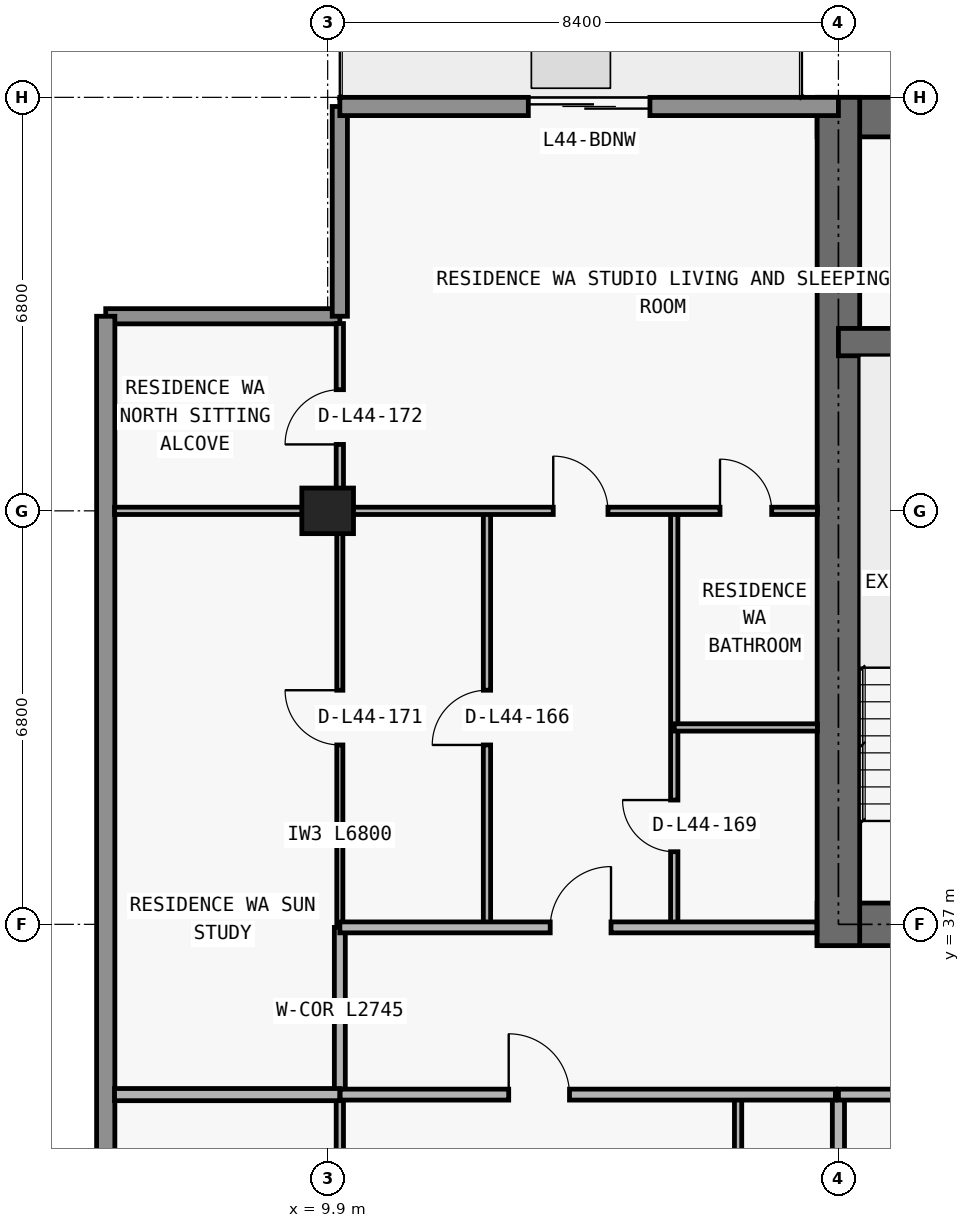
"""IFC4 building model, lengths in metres.
Left out: names, types, materials, properties, quantities, classifications, styles, units other than length and angle.
Written with IfcOpenShell. Run it as: python <this file> out.ifc"""

import sys

from ifc_helpers import new_model, si_unit, direction, frame, frame_2d, origin, origin_2d, place, context, subcontext, project, spatial, rectangle, extrude, element, fill, save


model = new_model("IFC4")
c1 = context("Model", 3, precision=1e-05, world=origin(), true_north=direction((0.0, 1.0)))
c2 = subcontext(c1, "Body", "Model", "MODEL_VIEW")
j1 = project(units=[si_unit("LENGTHUNIT", "METRE"), si_unit("PLANEANGLEUNIT", "RADIAN")], contexts=[c1])
p1 = place(None, origin())
s1 = spatial("IfcSite", under=j1, at=p1, CompositionType="ELEMENT")
p2 = place(p1, origin())
s2 = spatial("IfcBuilding", under=s1, at=p2, CompositionType="ELEMENT")
p3 = place(p2, frame((0.0, 0.0, 160.5)))
s3 = spatial("IfcBuildingStorey", under=s2, at=p3, CompositionType="ELEMENT", Elevation=160.5)
p4 = place(p3, frame((9.9, 43.8, 0.0), z_axis=(0.0, 0.0, 1.0), x_axis=(1.0, 0.0, 0.0)))
e1 = element("IfcColumn", 1, at=p4, inside=s3, PredefinedType="COLUMN", context=c2, shape_type="SweptSolid", body=[
    extrude(rectangle(XDim=0.85, YDim=0.75, at=origin_2d()), origin(), (0.0, 0.0, 1.0), 3.05),
])
p5 = place(p3, frame((17.95, 37.0, 0.0), z_axis=(0.0, 0.0, 1.0), x_axis=(1.0, 0.0, 0.0)))
e2 = element("IfcWall", 2, at=p5, inside=s3, PredefinedType="SHEAR", context=c2, shape_type="SweptSolid", body=[
    extrude(rectangle(XDim=41.9, YDim=0.7, at=frame_2d((20.95, 0.0))), origin(), (0.0, 0.0, 1.0), 3.05),
])
p6 = place(p5, frame((14.35, 0.0, 0.0)))
e3 = element("IfcOpeningElement", 3, at=p6, cuts=e2, PredefinedType="OPENING", context=c2, shape_type="SweptSolid", body=[
    extrude(rectangle(XDim=1.1, YDim=2.15, at=frame_2d((0.55, 1.075))), frame((0.0, 0.36, 0.0), z_axis=(0.0, -1.0, 0.0), x_axis=(1.0, 0.0, 0.0)), (0.0, 0.0, 1.0), 0.72),
])
p7 = place(p5, frame((6.2, 0.0, 0.0)))
e4 = element("IfcOpeningElement", 4, at=p7, cuts=e2, PredefinedType="OPENING", context=c2, shape_type="SweptSolid", body=[
    extrude(rectangle(XDim=1.05, YDim=2.15, at=frame_2d((0.525, 1.075))), frame((0.0, 0.36, 0.0), z_axis=(0.0, -1.0, 0.0), x_axis=(1.0, 0.0, 0.0)), (0.0, 0.0, 1.0), 0.72),
])
p8 = place(p5, frame((34.7, 0.0, 0.0)))
e5 = element("IfcOpeningElement", 5, at=p8, cuts=e2, PredefinedType="OPENING", context=c2, shape_type="SweptSolid", body=[
    extrude(rectangle(XDim=1.05, YDim=2.15, at=frame_2d((0.525, 1.075))), frame((0.0, 0.36, 0.0), z_axis=(0.0, -1.0, 0.0), x_axis=(1.0, 0.0, 0.0)), (0.0, 0.0, 1.0), 0.72),
])
p9 = place(p5, frame((10.812, 0.0, 0.0)))
e6 = element("IfcOpeningElement", 6, at=p9, cuts=e2, PredefinedType="OPENING", context=c2, shape_type="SweptSolid", body=[
    extrude(rectangle(XDim=1.05, YDim=2.15, at=frame_2d((0.525, 1.075))), frame((0.0, 0.36, 0.0), z_axis=(0.0, -1.0, 0.0), x_axis=(1.0, 0.0, 0.0)), (0.0, 0.0, 1.0), 0.72),
])
p10 = place(p5, frame((24.05, 0.0, 0.0)))
e7 = element("IfcOpeningElement", 7, at=p10, cuts=e2, PredefinedType="OPENING", context=c2, shape_type="SweptSolid", body=[
    extrude(rectangle(XDim=1.05, YDim=2.15, at=frame_2d((0.525, 1.075))), frame((0.0, 0.36, 0.0), z_axis=(0.0, -1.0, 0.0), x_axis=(1.0, 0.0, 0.0)), (0.0, 0.0, 1.0), 0.72),
])
p11 = place(p3, frame((17.95, 50.275, 0.0), z_axis=(0.0, 0.0, 1.0), x_axis=(1.0, 0.0, 0.0)))
e8 = element("IfcWall", 8, at=p11, inside=s3, PredefinedType="SHEAR", context=c2, shape_type="SweptSolid", body=[
    extrude(rectangle(XDim=41.9, YDim=0.65, at=frame_2d((20.95, 0.0))), origin(), (0.0, 0.0, 1.0), 3.05),
])
p12 = place(p3, frame((18.3, 36.65, 0.0), z_axis=(0.0, 0.0, 1.0), x_axis=(0.0, 1.0, 0.0)))
e9 = element("IfcWall", 9, at=p12, inside=s3, PredefinedType="SHEAR", context=c2, shape_type="SweptSolid", body=[
    extrude(rectangle(XDim=13.95, YDim=0.7, at=frame_2d((6.975, 0.0))), origin(), (0.0, 0.0, 1.0), 3.05),
])
p13 = place(p3, frame((18.3, 46.575, 0.0), z_axis=(0.0, 0.0, 1.0), x_axis=(1.0, 0.0, 0.0)))
e10 = element("IfcWall", 10, at=p13, inside=s3, PredefinedType="SHEAR", context=c2, shape_type="SweptSolid", body=[
    extrude(rectangle(XDim=41.2, YDim=0.45, at=frame_2d((20.6, 0.0))), origin(), (0.0, 0.0, 1.0), 3.05),
])
p14 = place(p13, frame((7.6, 0.0, 0.0)))
e11 = element("IfcOpeningElement", 11, at=p14, cuts=e10, PredefinedType="OPENING", context=c2, shape_type="SweptSolid", body=[
    extrude(rectangle(XDim=1.0, YDim=2.2, at=frame_2d((0.5, 1.1))), frame((0.0, 0.235, 0.0), z_axis=(0.0, -1.0, 0.0), x_axis=(1.0, 0.0, 0.0)), (0.0, 0.0, 1.0), 0.47),
])
p15 = place(p13, frame((32.625, 0.0, 0.0)))
e12 = element("IfcOpeningElement", 12, at=p15, cuts=e10, PredefinedType="OPENING", context=c2, shape_type="SweptSolid", body=[
    extrude(rectangle(XDim=1.05, YDim=2.15, at=frame_2d((0.525, 1.075))), frame((0.0, 0.235, 0.0), z_axis=(0.0, -1.0, 0.0), x_axis=(1.0, 0.0, 0.0)), (0.0, 0.0, 1.0), 0.47),
])
p16 = place(p3, frame((6.25, 47.0, 0.0), z_axis=(0.0, 0.0, 1.0), x_axis=(1.0, 0.0, 0.0)))
e13 = element("IfcWall", 13, at=p16, inside=s3, PredefinedType="ELEMENTEDWALL", context=c2, shape_type="SweptSolid", body=[
    extrude(rectangle(XDim=3.85, YDim=0.25, at=frame_2d((1.925, 0.0))), origin(), (0.0, 0.0, 1.0), 3.05),
])
p17 = place(p3, frame((10.1, 47.0, 0.0), z_axis=(0.0, 0.0, 1.0), x_axis=(0.0, 1.0, 0.0)))
e14 = element("IfcWall", 14, at=p17, inside=s3, PredefinedType="ELEMENTEDWALL", context=c2, shape_type="SweptSolid", body=[
    extrude(rectangle(XDim=3.45, YDim=0.25, at=frame_2d((1.725, 0.0))), origin(), (0.0, 0.0, 1.0), 3.05),
])
p18 = place(p3, frame((6.25, 29.1, 0.0), z_axis=(0.0, 0.0, 1.0), x_axis=(0.0, 1.0, 0.0)))
e15 = element("IfcWall", 15, at=p18, inside=s3, PredefinedType="STANDARD", context=c2, shape_type="SweptSolid", body=[
    extrude(rectangle(XDim=17.9, YDim=0.3, at=frame_2d((8.95, 0.0))), origin(), (0.0, 0.0, 1.0), 3.05),
])
p19 = place(p3, frame((10.1, 50.45, 0.0), z_axis=(0.0, 0.0, 1.0), x_axis=(1.0, 0.0, 0.0)))
e16 = element("IfcWall", 16, at=p19, inside=s3, PredefinedType="STANDARD", context=c2, shape_type="SweptSolid", body=[
    extrude(rectangle(XDim=8.2, YDim=0.3, at=frame_2d((4.1, 0.0))), origin(), (0.0, 0.0, 1.0), 3.05),
])
p20 = place(p19, frame((3.1, 0.0, 0.0)))
e17 = element("IfcOpeningElement", 17, at=p20, cuts=e16, PredefinedType="OPENING", context=c2, shape_type="SweptSolid", body=[
    extrude(rectangle(XDim=2.0, YDim=2.3, at=frame_2d((1.0, 1.15))), frame((0.0, 0.16, 0.0), z_axis=(0.0, -1.0, 0.0), x_axis=(1.0, 0.0, 0.0)), (0.0, 0.0, 1.0), 0.32),
])
p21 = place(p3, frame((10.1, 27.64, 0.0), z_axis=(0.0, 0.0, 1.0), x_axis=(0.0, 1.0, 0.0)))
e18 = element("IfcWall", 18, at=p21, inside=s3, PredefinedType="PARTITIONING", context=c2, shape_type="SweptSolid", body=[
    extrude(rectangle(XDim=6.56, YDim=0.12, at=frame_2d((3.28, 0.0))), origin(), (0.0, 0.0, 1.0), 2.263),
])
p22 = place(p3, frame((10.1, 34.205, 0.0), z_axis=(0.0, 0.0, 1.0), x_axis=(0.0, 1.0, 0.0)))
e19 = element("IfcWall", 19, at=p22, inside=s3, PredefinedType="PARTITIONING", context=c2, shape_type="SweptSolid", body=[
    extrude(rectangle(XDim=2.745, YDim=0.18, at=frame_2d((1.373, 0.0))), origin(), (0.0, 0.0, 1.0), 2.263),
])
p23 = place(p3, frame((10.1, 37.0, 0.0), z_axis=(0.0, 0.0, 1.0), x_axis=(0.0, 1.0, 0.0)))
e20 = element("IfcWall", 20, at=p23, inside=s3, PredefinedType="MOVABLE", context=c2, shape_type="SweptSolid", body=[
    extrude(rectangle(XDim=6.8, YDim=0.1, at=frame_2d((3.4, 0.0))), origin(), (0.0, 0.0, 1.0), 2.263),
])
p24 = place(p23, frame((2.95, 0.0, 0.0)))
e21 = element("IfcOpeningElement", 21, at=p24, cuts=e20, PredefinedType="OPENING", context=c2, shape_type="SweptSolid", body=[
    extrude(rectangle(XDim=0.9, YDim=2.15, at=frame_2d((0.45, 1.075))), frame((0.0, 0.06, 0.0), z_axis=(0.0, -1.0, 0.0), x_axis=(1.0, 0.0, 0.0)), (0.0, 0.0, 1.0), 0.12),
])
p25 = place(p3, frame((10.1, 43.805, 0.0), z_axis=(0.0, 0.0, 1.0), x_axis=(0.0, 1.0, 0.0)))
e22 = element("IfcWall", 22, at=p25, inside=s3, PredefinedType="PARTITIONING", context=c2, shape_type="SweptSolid", body=[
    extrude(rectangle(XDim=3.075, YDim=0.12, at=frame_2d((1.538, 0.0))), origin(), (0.0, 0.0, 1.0), 3.05),
])
p26 = place(p25, frame((1.087, 0.0, 0.0)))
e23 = element("IfcOpeningElement", 23, at=p26, cuts=e22, PredefinedType="OPENING", context=c2, shape_type="SweptSolid", body=[
    extrude(rectangle(XDim=0.9, YDim=2.15, at=frame_2d((0.45, 1.075))), frame((0.0, 0.07, 0.0), z_axis=(0.0, -1.0, 0.0), x_axis=(1.0, 0.0, 0.0)), (0.0, 0.0, 1.0), 0.14),
])
p27 = place(p3, frame((12.52, 37.0, 0.0), z_axis=(0.0, 0.0, 1.0), x_axis=(0.0, 1.0, 0.0)))
e24 = element("IfcWall", 24, at=p27, inside=s3, PredefinedType="PARTITIONING", context=c2, shape_type="SweptSolid", body=[
    extrude(rectangle(XDim=6.8, YDim=0.12, at=frame_2d((3.4, 0.0))), origin(), (0.0, 0.0, 1.0), 2.578),
])
p28 = place(p27, frame((2.95, 0.0, 0.0)))
e25 = element("IfcOpeningElement", 25, at=p28, cuts=e24, PredefinedType="OPENING", context=c2, shape_type="SweptSolid", body=[
    extrude(rectangle(XDim=0.9, YDim=2.15, at=frame_2d((0.45, 1.075))), frame((0.0, 0.07, 0.0), z_axis=(0.0, -1.0, 0.0), x_axis=(1.0, 0.0, 0.0)), (0.0, 0.0, 1.0), 0.14),
])
p29 = place(p3, frame((15.6, 37.0, 0.0), z_axis=(0.0, 0.0, 1.0), x_axis=(0.0, 1.0, 0.0)))
e26 = element("IfcWall", 26, at=p29, inside=s3, PredefinedType="PARTITIONING", context=c2, shape_type="SweptSolid", body=[
    extrude(rectangle(XDim=6.8, YDim=0.12, at=frame_2d((3.4, 0.0))), origin(), (0.0, 0.0, 1.0), 2.679),
])
p30 = place(p29, frame((1.194, 0.0, 0.0)))
e27 = element("IfcOpeningElement", 27, at=p30, cuts=e26, PredefinedType="OPENING", context=c2, shape_type="SweptSolid", body=[
    extrude(rectangle(XDim=0.85, YDim=2.1, at=frame_2d((0.425, 1.05))), frame((0.0, 0.07, 0.0), z_axis=(0.0, -1.0, 0.0), x_axis=(1.0, 0.0, 0.0)), (0.0, 0.0, 1.0), 0.14),
])
p31 = place(p3, frame((16.65, 27.64, 0.0), z_axis=(0.0, 0.0, 1.0), x_axis=(0.0, 1.0, 0.0)))
e28 = element("IfcWall", 28, at=p31, inside=s3, PredefinedType="PARTITIONING", context=c2, shape_type="SweptSolid", body=[
    extrude(rectangle(XDim=6.56, YDim=0.12, at=frame_2d((3.28, 0.0))), origin(), (0.0, 0.0, 1.0), 3.05),
])
p32 = place(p31, frame((2.855, 0.0, 0.0)))
e29 = element("IfcOpeningElement", 29, at=p32, cuts=e28, PredefinedType="OPENING", context=c2, shape_type="SweptSolid", body=[
    extrude(rectangle(XDim=0.85, YDim=2.1, at=frame_2d((0.425, 1.05))), frame((0.0, 0.07, 0.0), z_axis=(0.0, -1.0, 0.0), x_axis=(1.0, 0.0, 0.0)), (0.0, 0.0, 1.0), 0.14),
])
p33 = place(p3, frame((18.3, 27.64, 0.0), z_axis=(0.0, 0.0, 1.0), x_axis=(0.0, 1.0, 0.0)))
e30 = element("IfcWall", 30, at=p33, inside=s3, PredefinedType="PARTITIONING", context=c2, shape_type="SweptSolid", body=[
    extrude(rectangle(XDim=6.56, YDim=0.2, at=frame_2d((3.28, 0.0))), origin(), (0.0, 0.0, 1.0), 2.263),
])
p34 = place(p3, frame((6.395, 34.2, 0.0), z_axis=(0.0, 0.0, 1.0), x_axis=(1.0, 0.0, 0.0)))
e31 = element("IfcWall", 31, at=p34, inside=s3, PredefinedType="PARTITIONING", context=c2, shape_type="SweptSolid", body=[
    extrude(rectangle(XDim=3.705, YDim=0.2, at=frame_2d((1.853, 0.0))), origin(), (0.0, 0.0, 1.0), 3.05),
])
p35 = place(p3, frame((10.105, 34.2, 0.0), z_axis=(0.0, 0.0, 1.0), x_axis=(1.0, 0.0, 0.0)))
e32 = element("IfcWall", 32, at=p35, inside=s3, PredefinedType="PARTITIONING", context=c2, shape_type="SweptSolid", body=[
    extrude(rectangle(XDim=8.145, YDim=0.18, at=frame_2d((4.073, 0.0))), origin(), (0.0, 0.0, 1.0), 3.05),
])
p36 = place(p35, frame((2.772, 0.0, 0.0)))
e33 = element("IfcOpeningElement", 33, at=p36, cuts=e32, PredefinedType="OPENING", context=c2, shape_type="SweptSolid", body=[
    extrude(rectangle(XDim=1.0, YDim=2.2, at=frame_2d((0.5, 1.1))), frame((0.0, 0.1, 0.0), z_axis=(0.0, -1.0, 0.0), x_axis=(1.0, 0.0, 0.0)), (0.0, 0.0, 1.0), 0.2),
])
p37 = place(p3, frame((18.3, 34.2, 0.0), z_axis=(0.0, 0.0, 1.0), x_axis=(1.0, 0.0, 0.0)))
e34 = element("IfcWall", 34, at=p37, inside=s3, PredefinedType="PARTITIONING", context=c2, shape_type="SweptSolid", body=[
    extrude(rectangle(XDim=37.586, YDim=0.18, at=frame_2d((18.793, 0.0))), origin(), (0.0, 0.0, 1.0), 3.05),
])
p38 = place(p37, frame((2.875, 0.0, 0.0)))
e35 = element("IfcOpeningElement", 35, at=p38, cuts=e34, PredefinedType="OPENING", context=c2, shape_type="SweptSolid", body=[
    extrude(rectangle(XDim=1.0, YDim=2.2, at=frame_2d((0.5, 1.1))), frame((0.0, 0.1, 0.0), z_axis=(0.0, -1.0, 0.0), x_axis=(1.0, 0.0, 0.0)), (0.0, 0.0, 1.0), 0.2),
])
p39 = place(p37, frame((11.315, 0.0, 0.0)))
e36 = element("IfcOpeningElement", 36, at=p39, cuts=e34, PredefinedType="OPENING", context=c2, shape_type="SweptSolid", body=[
    extrude(rectangle(XDim=1.0, YDim=2.2, at=frame_2d((0.5, 1.1))), frame((0.0, 0.1, 0.0), z_axis=(0.0, -1.0, 0.0), x_axis=(1.0, 0.0, 0.0)), (0.0, 0.0, 1.0), 0.2),
])
p40 = place(p37, frame((27.275, 0.0, 0.0)))
e37 = element("IfcOpeningElement", 37, at=p40, cuts=e34, PredefinedType="OPENING", context=c2, shape_type="SweptSolid", body=[
    extrude(rectangle(XDim=1.0, YDim=2.2, at=frame_2d((0.5, 1.1))), frame((0.0, 0.1, 0.0), z_axis=(0.0, -1.0, 0.0), x_axis=(1.0, 0.0, 0.0)), (0.0, 0.0, 1.0), 0.2),
])
p41 = place(p37, frame((34.693, 0.0, 0.0)))
e38 = element("IfcOpeningElement", 38, at=p41, cuts=e34, PredefinedType="OPENING", context=c2, shape_type="SweptSolid", body=[
    extrude(rectangle(XDim=1.0, YDim=2.2, at=frame_2d((0.5, 1.1))), frame((0.0, 0.1, 0.0), z_axis=(0.0, -1.0, 0.0), x_axis=(1.0, 0.0, 0.0)), (0.0, 0.0, 1.0), 0.2),
])
p42 = place(p3, frame((10.1, 36.95, 0.0), z_axis=(0.0, 0.0, 1.0), x_axis=(1.0, 0.0, 0.0)))
e39 = element("IfcWall", 39, at=p42, inside=s3, PredefinedType="PARTITIONING", context=c2, shape_type="SweptSolid", body=[
    extrude(rectangle(XDim=7.845, YDim=0.18, at=frame_2d((3.922, 0.0))), origin(), (0.0, 0.0, 1.0), 3.05),
])
p43 = place(p42, frame((3.46, 0.0, 0.0)))
e40 = element("IfcOpeningElement", 40, at=p43, cuts=e39, PredefinedType="OPENING", context=c2, shape_type="SweptSolid", body=[
    extrude(rectangle(XDim=1.0, YDim=2.2, at=frame_2d((0.5, 1.1))), frame((0.0, 0.1, 0.0), z_axis=(0.0, -1.0, 0.0), x_axis=(1.0, 0.0, 0.0)), (0.0, 0.0, 1.0), 0.2),
])
p44 = place(p3, frame((15.6, 40.238, 0.0), z_axis=(0.0, 0.0, 1.0), x_axis=(1.0, 0.0, 0.0)))
e41 = element("IfcWall", 41, at=p44, inside=s3, PredefinedType="PARTITIONING", context=c2, shape_type="SweptSolid", body=[
    extrude(rectangle(XDim=2.355, YDim=0.12, at=frame_2d((1.177, 0.0))), origin(), (0.0, 0.0, 1.0), 3.05),
])
p45 = place(p3, frame((6.395, 43.8, 0.0), z_axis=(0.0, 0.0, 1.0), x_axis=(1.0, 0.0, 0.0)))
e42 = element("IfcWall", 42, at=p45, inside=s3, PredefinedType="PARTITIONING", context=c2, shape_type="SweptSolid", body=[
    extrude(rectangle(XDim=11.56, YDim=0.12, at=frame_2d((5.78, 0.0))), origin(), (0.0, 0.0, 1.0), 2.418),
])
p46 = place(p45, frame((7.215, 0.0, 0.0)))
e43 = element("IfcOpeningElement", 43, at=p46, cuts=e42, PredefinedType="OPENING", context=c2, shape_type="SweptSolid", body=[
    extrude(rectangle(XDim=0.9, YDim=2.15, at=frame_2d((0.45, 1.075))), frame((0.0, 0.07, 0.0), z_axis=(0.0, -1.0, 0.0), x_axis=(1.0, 0.0, 0.0)), (0.0, 0.0, 1.0), 0.14),
])
p47 = place(p45, frame((9.958, 0.0, 0.0)))
e44 = element("IfcOpeningElement", 44, at=p47, cuts=e42, PredefinedType="OPENING", context=c2, shape_type="SweptSolid", body=[
    extrude(rectangle(XDim=0.85, YDim=2.1, at=frame_2d((0.425, 1.05))), frame((0.0, 0.07, 0.0), z_axis=(0.0, -1.0, 0.0), x_axis=(1.0, 0.0, 0.0)), (0.0, 0.0, 1.0), 0.14),
])
p48 = place(p20, origin())
e45 = element("IfcDoor", 45, at=p48, inside=s3, OperationType="DOUBLE_DOOR_SLIDING", PredefinedType="DOOR", context=c2, shape_type="SweptSolid", body=[
    extrude(rectangle(XDim=2.0, YDim=2.3, at=frame_2d((1.0, 1.15))), frame((0.0, 0.025, 0.0), z_axis=(0.0, -1.0, 0.0), x_axis=(1.0, 0.0, 0.0)), (0.0, 0.0, 1.0), 0.05),
])
fill(e17, e45)
p49 = place(p36, origin())
e46 = element("IfcDoor", 46, at=p49, inside=s3, OperationType="SINGLE_SWING_LEFT", PredefinedType="DOOR", context=c2, shape_type="SweptSolid", body=[
    extrude(rectangle(XDim=1.0, YDim=2.2, at=frame_2d((0.5, 1.1))), frame((0.0, 0.025, 0.0), z_axis=(0.0, -1.0, 0.0), x_axis=(1.0, 0.0, 0.0)), (0.0, 0.0, 1.0), 0.05),
])
fill(e33, e46)
p50 = place(p28, origin())
e47 = element("IfcDoor", 47, at=p50, inside=s3, OperationType="SINGLE_SWING_LEFT", PredefinedType="DOOR", context=c2, shape_type="SweptSolid", body=[
    extrude(rectangle(XDim=0.9, YDim=2.15, at=frame_2d((0.45, 1.075))), frame((0.0, 0.025, 0.0), z_axis=(0.0, -1.0, 0.0), x_axis=(1.0, 0.0, 0.0)), (0.0, 0.0, 1.0), 0.05),
])
fill(e25, e47)
p51 = place(p43, origin())
e48 = element("IfcDoor", 48, at=p51, inside=s3, OperationType="SINGLE_SWING_RIGHT", PredefinedType="DOOR", context=c2, shape_type="SweptSolid", body=[
    extrude(rectangle(XDim=1.0, YDim=2.2, at=frame_2d((0.5, 1.1))), frame((0.0, 0.025, 0.0), z_axis=(0.0, -1.0, 0.0), x_axis=(1.0, 0.0, 0.0)), (0.0, 0.0, 1.0), 0.05),
])
fill(e40, e48)
p52 = place(p46, origin())
e49 = element("IfcDoor", 49, at=p52, inside=s3, OperationType="SINGLE_SWING_LEFT", PredefinedType="DOOR", context=c2, shape_type="SweptSolid", body=[
    extrude(rectangle(XDim=0.9, YDim=2.15, at=frame_2d((0.45, 1.075))), frame((0.0, 0.025, 0.0), z_axis=(0.0, -1.0, 0.0), x_axis=(1.0, 0.0, 0.0)), (0.0, 0.0, 1.0), 0.05),
])
fill(e43, e49)
p53 = place(p30, origin())
e50 = element("IfcDoor", 50, at=p53, inside=s3, OperationType="SINGLE_SWING_RIGHT", PredefinedType="DOOR", context=c2, shape_type="SweptSolid", body=[
    extrude(rectangle(XDim=0.85, YDim=2.1, at=frame_2d((0.425, 1.05))), frame((0.0, 0.025, 0.0), z_axis=(0.0, -1.0, 0.0), x_axis=(1.0, 0.0, 0.0)), (0.0, 0.0, 1.0), 0.05),
])
fill(e27, e50)
p54 = place(p47, origin())
e51 = element("IfcDoor", 51, at=p54, inside=s3, OperationType="SINGLE_SWING_LEFT", PredefinedType="DOOR", context=c2, shape_type="SweptSolid", body=[
    extrude(rectangle(XDim=0.85, YDim=2.1, at=frame_2d((0.425, 1.05))), frame((0.0, 0.025, 0.0), z_axis=(0.0, -1.0, 0.0), x_axis=(1.0, 0.0, 0.0)), (0.0, 0.0, 1.0), 0.05),
])
fill(e44, e51)
p55 = place(p24, origin())
e52 = element("IfcDoor", 52, at=p55, inside=s3, OperationType="SINGLE_SWING_RIGHT", PredefinedType="DOOR", context=c2, shape_type="SweptSolid", body=[
    extrude(rectangle(XDim=0.9, YDim=2.15, at=frame_2d((0.45, 1.075))), frame((0.0, 0.025, 0.0), z_axis=(0.0, -1.0, 0.0), x_axis=(1.0, 0.0, 0.0)), (0.0, 0.0, 1.0), 0.05),
])
fill(e21, e52)
p56 = place(p26, origin())
e53 = element("IfcDoor", 53, at=p56, inside=s3, OperationType="SINGLE_SWING_LEFT", PredefinedType="DOOR", context=c2, shape_type="SweptSolid", body=[
    extrude(rectangle(XDim=0.9, YDim=2.15, at=frame_2d((0.45, 1.075))), frame((0.0, 0.025, 0.0), z_axis=(0.0, -1.0, 0.0), x_axis=(1.0, 0.0, 0.0)), (0.0, 0.0, 1.0), 0.05),
])
fill(e23, e53)
save(model, sys.argv[1])
